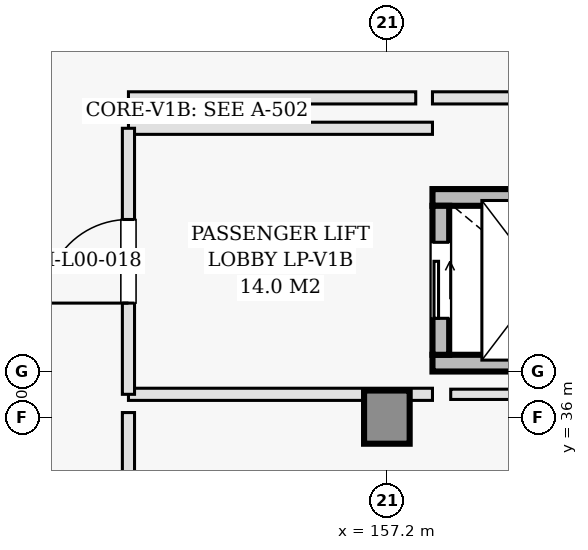
"""IFC4 building model, lengths in metres.
Left out: names, types, materials, properties, quantities, classifications, styles, units other than length and angle.
Written with IfcOpenShell. Run it as: python <this file> out.ifc"""

import sys

from ifc_helpers import new_model, si_unit, direction, frame, frame_2d, origin, origin_2d, place, context, subcontext, project, spatial, rectangle, extrude, element, fill, save


model = new_model("IFC4")
c1 = context("Model", 3, precision=1e-05, world=origin(), true_north=direction((0.0, 1.0)))
c2 = subcontext(c1, "Body", "Model", "MODEL_VIEW")
j1 = project(units=[si_unit("LENGTHUNIT", "METRE"), si_unit("PLANEANGLEUNIT", "RADIAN")], contexts=[c1])
p1 = place(None, origin())
s1 = spatial("IfcSite", under=j1, at=p1, CompositionType="ELEMENT")
p2 = place(p1, origin())
s2 = spatial("IfcBuilding", under=s1, at=p2, CompositionType="ELEMENT")
p3 = place(p2, origin())
s3 = spatial("IfcBuildingStorey", under=s2, at=p3, CompositionType="ELEMENT", Elevation=0.0)
p4 = place(p3, frame((157.2, 36.0, 0.0), z_axis=(0.0, 0.0, 1.0), x_axis=(1.0, 0.0, 0.0)))
e1 = element("IfcColumn", 1, at=p4, inside=s3, PredefinedType="COLUMN", context=c2, shape_type="SweptSolid", body=[
    extrude(rectangle(XDim=0.7, YDim=0.7, at=origin_2d()), origin(), (0.0, 0.0, 1.0), 4.8),
])
for number, where, z_axis, x_axis in (
    (2, (157.8, 36.71, 0.0), (0.0, 0.0, 1.0), (1.0, 0.0, 0.0)),
    (3, (157.8, 38.89, 0.0), (0.0, 0.0, 1.0), (1.0, 0.0, 0.0)),
):
    element("IfcWall", number, at=place(p3, frame(where, z_axis=z_axis, x_axis=x_axis)), inside=s3, PredefinedType="SHEAR", context=c2, shape_type="SweptSolid", body=[
        extrude(rectangle(XDim=2.9, YDim=0.22, at=frame_2d((1.45, 0.0))), origin(), (0.0, 0.0, 1.0), 4.52),
    ])
p5 = place(p3, frame((157.91, 36.82, 0.0), z_axis=(0.0, 0.0, 1.0), x_axis=(0.0, 1.0, 0.0)))
e4 = element("IfcWall", 4, at=p5, inside=s3, PredefinedType="SHEAR", context=c2, shape_type="SweptSolid", body=[
    extrude(rectangle(XDim=1.96, YDim=0.22, at=frame_2d((0.98, 0.0))), origin(), (0.0, 0.0, 1.0), 4.52),
])
p6 = place(p5, frame((0.48, 0.0, 0.0)))
e5 = element("IfcOpeningElement", 5, at=p6, cuts=e4, PredefinedType="OPENING", context=c2, shape_type="SweptSolid", body=[
    extrude(rectangle(XDim=1.0, YDim=2.15, at=frame_2d((0.5, 1.075))), frame((0.0, 0.12, 0.0), z_axis=(0.0, -1.0, 0.0), x_axis=(1.0, 0.0, 0.0)), (0.0, 0.0, 1.0), 0.24),
])
p7 = place(p3, frame((153.8, 36.3, 0.0), z_axis=(0.0, 0.0, 1.0), x_axis=(1.0, 0.0, 0.0)))
e6 = element("IfcWall", 6, at=p7, inside=s3, PredefinedType="PARTITIONING", context=c2, shape_type="SweptSolid", body=[
    extrude(rectangle(XDim=4.0, YDim=0.16, at=frame_2d((2.0, 0.0))), origin(), (0.0, 0.0, 1.0), 3.705),
])
p8 = place(p3, frame((153.8, 39.8, 0.0), z_axis=(0.0, 0.0, 1.0), x_axis=(1.0, 0.0, 0.0)))
e7 = element("IfcWall", 7, at=p8, inside=s3, PredefinedType="PARTITIONING", context=c2, shape_type="SweptSolid", body=[
    extrude(rectangle(XDim=4.0, YDim=0.16, at=frame_2d((2.0, 0.0))), origin(), (0.0, 0.0, 1.0), 3.855),
])
p9 = place(p3, frame((153.8, 36.3, 0.0), z_axis=(0.0, 0.0, 1.0), x_axis=(0.0, 1.0, 0.0)))
e8 = element("IfcWall", 8, at=p9, inside=s3, PredefinedType="PARTITIONING", context=c2, shape_type="SweptSolid", body=[
    extrude(rectangle(XDim=3.5, YDim=0.16, at=frame_2d((1.75, 0.0))), origin(), (0.0, 0.0, 1.0), 4.065),
])
p10 = place(p9, frame((1.2, 0.0, 0.0)))
e9 = element("IfcOpeningElement", 9, at=p10, cuts=e8, PredefinedType="OPENING", context=c2, shape_type="SweptSolid", body=[
    extrude(rectangle(XDim=1.1, YDim=2.15, at=frame_2d((0.55, 1.075))), frame((0.0, 0.09, 0.0), z_axis=(0.0, -1.0, 0.0), x_axis=(1.0, 0.0, 0.0)), (0.0, 0.0, 1.0), 0.18),
])
p11 = place(p3, frame((153.8, 24.85, 0.0), z_axis=(0.0, 0.0, 1.0), x_axis=(0.0, 1.0, 0.0)))
e10 = element("IfcWall", 10, at=p11, inside=s3, PredefinedType="PARTITIONING", context=c2, shape_type="SweptSolid", body=[
    extrude(rectangle(XDim=11.21, YDim=0.16, at=frame_2d((5.605, 0.0))), origin(), (0.0, 0.0, 1.0), 3.705),
])
p12 = place(p11, frame((5.055, 0.0, 0.0)))
e11 = element("IfcOpeningElement", 11, at=p12, cuts=e10, PredefinedType="OPENING", context=c2, shape_type="SweptSolid", body=[
    extrude(rectangle(XDim=1.1, YDim=2.15, at=frame_2d((0.55, 1.075))), frame((0.0, 0.09, 0.0), z_axis=(0.0, -1.0, 0.0), x_axis=(1.0, 0.0, 0.0)), (0.0, 0.0, 1.0), 0.18),
])
p13 = place(p3, frame((158.04, 36.3, 0.0), z_axis=(0.0, 0.0, 1.0), x_axis=(1.0, 0.0, 0.0)))
e12 = element("IfcWall", 12, at=p13, inside=s3, PredefinedType="PARTITIONING", context=c2, shape_type="SweptSolid", body=[
    extrude(rectangle(XDim=8.891, YDim=0.135, at=frame_2d((4.445, 0.0))), origin(), (0.0, 0.0, 1.0), 3.705),
])
p14 = place(p3, frame((157.8, 40.2, 0.0), z_axis=(0.0, 0.0, 1.0), x_axis=(1.0, 0.0, 0.0)))
e13 = element("IfcWall", 13, at=p14, inside=s3, PredefinedType="PARTITIONING", context=c2, shape_type="SweptSolid", body=[
    extrude(rectangle(XDim=2.58, YDim=0.16, at=frame_2d((1.29, 0.0))), origin(), (0.0, 0.0, 1.0), 4.52),
])
p15 = place(p3, frame((153.8, 40.2, 0.0), z_axis=(0.0, 0.0, 1.0), x_axis=(1.0, 0.0, 0.0)))
e14 = element("IfcWall", 14, at=p15, inside=s3, PredefinedType="PARTITIONING", context=c2, shape_type="SweptSolid", body=[
    extrude(rectangle(XDim=3.78, YDim=0.16, at=frame_2d((1.89, 0.0))), origin(), (0.0, 0.0, 1.0), 3.855),
])
p16 = place(p6, origin())
e15 = element("IfcDoor", 15, at=p16, inside=s3, OperationType="SLIDING_TO_LEFT", PredefinedType="DOOR", context=c2, shape_type="SweptSolid", body=[
    extrude(rectangle(XDim=1.0, YDim=2.15, at=frame_2d((0.5, 1.075))), frame((0.0, 0.025, 0.0), z_axis=(0.0, -1.0, 0.0), x_axis=(1.0, 0.0, 0.0)), (0.0, 0.0, 1.0), 0.05),
])
fill(e5, e15)
p17 = place(p10, origin())
e16 = element("IfcDoor", 16, at=p17, inside=s3, OperationType="SINGLE_SWING_LEFT", PredefinedType="DOOR", context=c2, shape_type="SweptSolid", body=[
    extrude(rectangle(XDim=1.1, YDim=2.15, at=frame_2d((0.55, 1.075))), frame((0.0, 0.025, 0.0), z_axis=(0.0, -1.0, 0.0), x_axis=(1.0, 0.0, 0.0)), (0.0, 0.0, 1.0), 0.05),
])
fill(e9, e16)
save(model, sys.argv[1])
